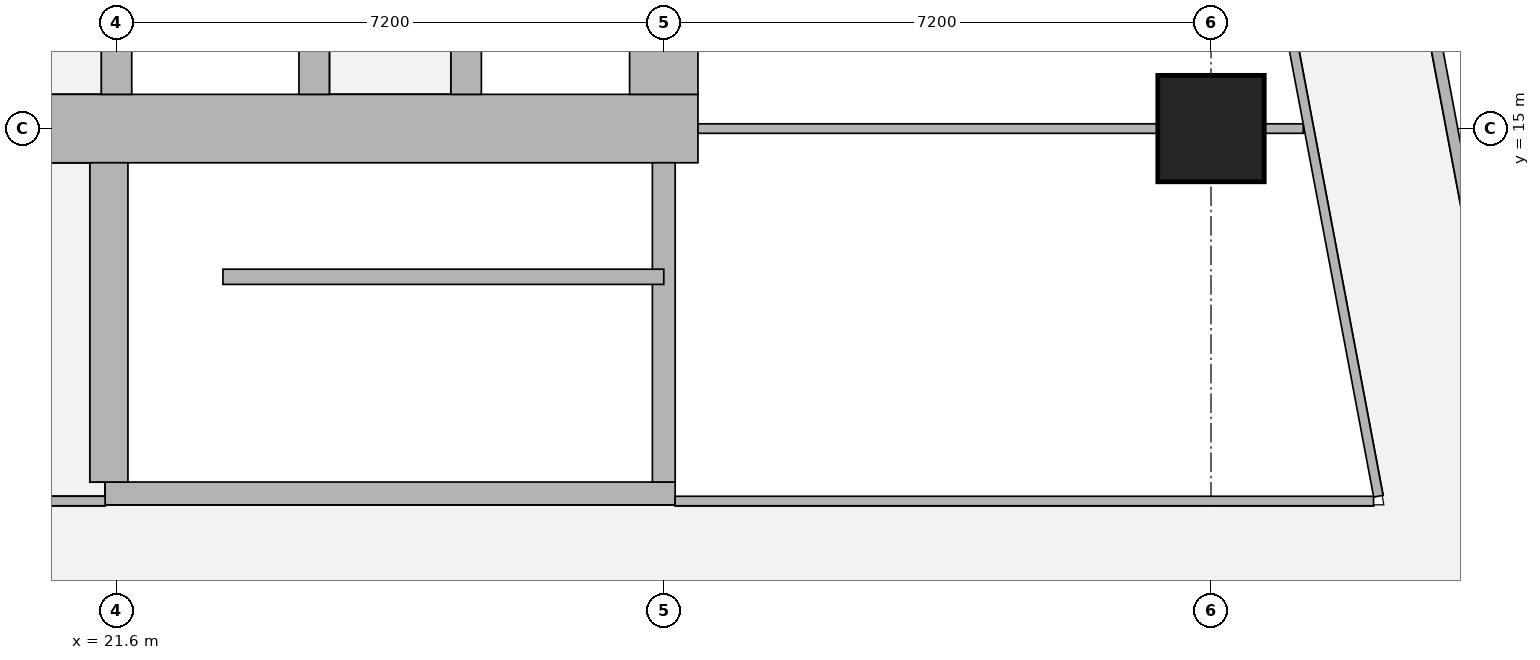
"""IFC4 building model, lengths in metres.
Left out: names, types, materials, properties, quantities, classifications, styles, units other than length and angle.
Written with IfcOpenShell. Run it as: python <this file> out.ifc"""

import sys

from ifc_helpers import new_model, si_unit, direction, frame, frame_2d, origin, origin_2d, place, context, subcontext, project, spatial, rectangle, extrude, element, fill, save


model = new_model("IFC4")
c1 = context("Model", 3, precision=1e-05, world=origin(), true_north=direction((0.0, 1.0)))
c2 = subcontext(c1, "Body", "Model", "MODEL_VIEW")
j1 = project(units=[si_unit("LENGTHUNIT", "METRE"), si_unit("PLANEANGLEUNIT", "RADIAN")], contexts=[c1])
p1 = place(None, origin())
s1 = spatial("IfcSite", under=j1, at=p1, CompositionType="ELEMENT")
p2 = place(p1, origin())
s2 = spatial("IfcBuilding", under=s1, at=p2, CompositionType="ELEMENT")
p3 = place(p2, frame((0.0, 0.0, 216.2)))
s3 = spatial("IfcBuildingStorey", under=s2, at=p3, CompositionType="ELEMENT", Elevation=216.2)
p4 = place(p3, frame((36.0, 15.0, 0.0), z_axis=(0.0, 0.0, 1.0), x_axis=(1.0, 0.0, 0.0)))
e1 = element("IfcColumn", 1, at=p4, inside=s3, PredefinedType="COLUMN", context=c2, shape_type="SweptSolid", body=[
    extrude(rectangle(XDim=1.4, YDim=1.4, at=origin_2d()), origin(), (0.0, 0.0, 1.0), 3.75),
])
p5 = place(p3, frame((13.95, 15.0, 0.0), z_axis=(0.0, 0.0, 1.0), x_axis=(1.0, 0.0, 0.0)))
e2 = element("IfcWall", 2, at=p5, inside=s3, PredefinedType="SHEAR", context=c2, shape_type="SweptSolid", body=[
    extrude(rectangle(XDim=15.3, YDim=0.9, at=frame_2d((7.65, 0.0))), origin(), (0.0, 0.0, 1.0), 3.75),
])
p6 = place(p5, frame((4.45, 0.0, 0.0)))
e3 = element("IfcOpeningElement", 3, at=p6, cuts=e2, PredefinedType="OPENING", context=c2, shape_type="SweptSolid", body=[
    extrude(rectangle(XDim=1.8, YDim=2.1, at=frame_2d((0.9, 1.05))), frame((0.0, 0.46, 0.0), z_axis=(0.0, -1.0, 0.0), x_axis=(1.0, 0.0, 0.0)), (0.0, 0.0, 1.0), 0.92),
])
p7 = place(p5, frame((10.7, 0.0, 0.0)))
e4 = element("IfcOpeningElement", 4, at=p7, cuts=e2, PredefinedType="OPENING", context=c2, shape_type="SweptSolid", body=[
    extrude(rectangle(XDim=1.1, YDim=2.1, at=frame_2d((0.55, 1.05))), frame((0.0, 0.46, 0.0), z_axis=(0.0, -1.0, 0.0), x_axis=(1.0, 0.0, 0.0)), (0.0, 0.0, 1.0), 0.92),
])
p8 = place(p3, frame((28.8, 15.45, 0.0), z_axis=(0.0, 0.0, 1.0), x_axis=(0.0, 1.0, 0.0)))
e5 = element("IfcWall", 5, at=p8, inside=s3, PredefinedType="SHEAR", context=c2, shape_type="SweptSolid", body=[
    extrude(rectangle(XDim=14.1, YDim=0.9, at=frame_2d((7.05, 0.0))), origin(), (0.0, 0.0, 1.0), 3.75),
])
p9 = place(p3, frame((21.6, 15.45, 0.0), z_axis=(0.0, 0.0, 1.0), x_axis=(0.0, 1.0, 0.0)))
e6 = element("IfcWall", 6, at=p9, inside=s3, PredefinedType="SHEAR", context=c2, shape_type="SweptSolid", body=[
    extrude(rectangle(XDim=14.1, YDim=0.4, at=frame_2d((7.05, 0.0))), origin(), (0.0, 0.0, 1.0), 3.75),
])
p10 = place(p9, frame((0.875, 0.0, 0.0)))
e7 = element("IfcOpeningElement", 7, at=p10, cuts=e6, PredefinedType="OPENING", context=c2, shape_type="SweptSolid", body=[
    extrude(rectangle(XDim=1.1, YDim=2.1, at=frame_2d((0.55, 1.05))), frame((0.0, 0.21, 0.0), z_axis=(0.0, -1.0, 0.0), x_axis=(1.0, 0.0, 0.0)), (0.0, 0.0, 1.0), 0.42),
])
p11 = place(p9, frame((4.625, 0.0, 0.0)))
e8 = element("IfcOpeningElement", 8, at=p11, cuts=e6, PredefinedType="OPENING", context=c2, shape_type="SweptSolid", body=[
    extrude(rectangle(XDim=1.1, YDim=2.1, at=frame_2d((0.55, 1.05))), frame((0.0, 0.21, 0.0), z_axis=(0.0, -1.0, 0.0), x_axis=(1.0, 0.0, 0.0)), (0.0, 0.0, 1.0), 0.42),
])
p12 = place(p9, frame((8.375, 0.0, 0.0)))
e9 = element("IfcOpeningElement", 9, at=p12, cuts=e6, PredefinedType="OPENING", context=c2, shape_type="SweptSolid", body=[
    extrude(rectangle(XDim=1.1, YDim=2.1, at=frame_2d((0.55, 1.05))), frame((0.0, 0.21, 0.0), z_axis=(0.0, -1.0, 0.0), x_axis=(1.0, 0.0, 0.0)), (0.0, 0.0, 1.0), 0.42),
])
p13 = place(p9, frame((12.125, 0.0, 0.0)))
e10 = element("IfcOpeningElement", 10, at=p13, cuts=e6, PredefinedType="OPENING", context=c2, shape_type="SweptSolid", body=[
    extrude(rectangle(XDim=1.1, YDim=2.1, at=frame_2d((0.55, 1.05))), frame((0.0, 0.21, 0.0), z_axis=(0.0, -1.0, 0.0), x_axis=(1.0, 0.0, 0.0)), (0.0, 0.0, 1.0), 0.42),
])
p14 = place(p3, frame((24.2, 15.45, 0.0), z_axis=(0.0, 0.0, 1.0), x_axis=(0.0, 1.0, 0.0)))
e11 = element("IfcWall", 11, at=p14, inside=s3, PredefinedType="SHEAR", context=c2, shape_type="SweptSolid", body=[
    extrude(rectangle(XDim=14.1, YDim=0.4, at=frame_2d((7.05, 0.0))), origin(), (0.0, 0.0, 1.0), 3.75),
])
p15 = place(p3, frame((26.2, 15.45, 0.0), z_axis=(0.0, 0.0, 1.0), x_axis=(0.0, 1.0, 0.0)))
e12 = element("IfcWall", 12, at=p15, inside=s3, PredefinedType="SHEAR", context=c2, shape_type="SweptSolid", body=[
    extrude(rectangle(XDim=3.1, YDim=0.4, at=frame_2d((1.55, 0.0))), origin(), (0.0, 0.0, 1.0), 3.75),
])
p16 = place(p15, frame((0.825, 0.0, 0.0)))
e13 = element("IfcOpeningElement", 13, at=p16, cuts=e12, PredefinedType="OPENING", context=c2, shape_type="SweptSolid", body=[
    extrude(rectangle(XDim=1.2, YDim=2.1, at=frame_2d((0.6, 1.05))), frame((0.0, 0.21, 0.0), z_axis=(0.0, -1.0, 0.0), x_axis=(1.0, 0.0, 0.0)), (0.0, 0.0, 1.0), 0.42),
])
p17 = place(p3, frame((21.45, 10.2, 0.0), z_axis=(0.0, 0.0, 1.0), x_axis=(1.0, 0.0, 0.0)))
e14 = element("IfcWall", 14, at=p17, inside=s3, PredefinedType="SHEAR", context=c2, shape_type="SweptSolid", body=[
    extrude(rectangle(XDim=7.5, YDim=0.3, at=frame_2d((3.75, 0.0))), origin(), (0.0, 0.0, 1.0), 3.75),
])
p18 = place(p17, frame((0.5, 0.0, 0.0)))
e15 = element("IfcOpeningElement", 15, at=p18, cuts=e14, PredefinedType="OPENING", context=c2, shape_type="SweptSolid", body=[
    extrude(rectangle(XDim=1.1, YDim=2.1, at=frame_2d((0.55, 1.05))), frame((0.0, 0.16, 0.0), z_axis=(0.0, -1.0, 0.0), x_axis=(1.0, 0.0, 0.0)), (0.0, 0.0, 1.0), 0.32),
])
p19 = place(p3, frame((21.5, 10.35, 0.0), z_axis=(0.0, 0.0, 1.0), x_axis=(0.0, 1.0, 0.0)))
e16 = element("IfcWall", 16, at=p19, inside=s3, PredefinedType="SHEAR", context=c2, shape_type="SweptSolid", body=[
    extrude(rectangle(XDim=4.2, YDim=0.5, at=frame_2d((2.1, 0.0))), origin(), (0.0, 0.0, 1.0), 3.75),
])
p20 = place(p3, frame((28.8, 10.35, 0.0), z_axis=(0.0, 0.0, 1.0), x_axis=(0.0, 1.0, 0.0)))
e17 = element("IfcWall", 17, at=p20, inside=s3, PredefinedType="SHEAR", context=c2, shape_type="SweptSolid", body=[
    extrude(rectangle(XDim=4.2, YDim=0.3, at=frame_2d((2.1, 0.0))), origin(), (0.0, 0.0, 1.0), 3.75),
])
p21 = place(p3, frame((33.933, 42.73, 0.0), z_axis=(0.0, 0.0, 1.0), x_axis=(0.185595417643, -0.982626246825, 0.0)))
e18 = element("IfcWall", 18, at=p21, inside=s3, PredefinedType="SOLIDWALL", context=c2, shape_type="SweptSolid", body=[
    extrude(rectangle(XDim=41.051, YDim=0.15, at=frame_2d((20.525, 0.0))), origin(), (0.0, 0.0, 1.0), 2.5),
])
p22 = place(p21, frame((12.266, 0.0, 0.0)))
e19 = element("IfcOpeningElement", 19, at=p22, cuts=e18, PredefinedType="OPENING", context=c2, shape_type="SweptSolid", body=[
    extrude(rectangle(XDim=1.0, YDim=2.1, at=frame_2d((0.5, 1.05))), frame((0.0, 0.085, 0.0), z_axis=(0.0, -1.0, 0.0), x_axis=(1.0, 0.0, 0.0)), (0.0, 0.0, 1.0), 0.17),
])
p23 = place(p21, frame((16.082, 0.0, 0.0)))
e20 = element("IfcOpeningElement", 20, at=p23, cuts=e18, PredefinedType="OPENING", context=c2, shape_type="SweptSolid", body=[
    extrude(rectangle(XDim=1.0, YDim=2.1, at=frame_2d((0.5, 1.05))), frame((0.0, 0.085, 0.0), z_axis=(0.0, -1.0, 0.0), x_axis=(1.0, 0.0, 0.0)), (0.0, 0.0, 1.0), 0.17),
])
p24 = place(p21, frame((24.369, 0.0, 0.0)))
e21 = element("IfcOpeningElement", 21, at=p24, cuts=e18, PredefinedType="OPENING", context=c2, shape_type="SweptSolid", body=[
    extrude(rectangle(XDim=1.0, YDim=2.1, at=frame_2d((0.5, 1.05))), frame((0.0, 0.085, 0.0), z_axis=(0.0, -1.0, 0.0), x_axis=(1.0, 0.0, 0.0)), (0.0, 0.0, 1.0), 0.17),
])
p25 = place(p21, frame((30.862, 0.0, 0.0)))
e22 = element("IfcOpeningElement", 22, at=p25, cuts=e18, PredefinedType="OPENING", context=c2, shape_type="SweptSolid", body=[
    extrude(rectangle(XDim=1.0, YDim=2.1, at=frame_2d((0.5, 1.05))), frame((0.0, 0.085, 0.0), z_axis=(0.0, -1.0, 0.0), x_axis=(1.0, 0.0, 0.0)), (0.0, 0.0, 1.0), 0.17),
])
p26 = place(p3, frame((10.713, 10.1, 0.0), z_axis=(0.0, 0.0, 1.0), x_axis=(1.0, 0.0, 0.0)))
e23 = element("IfcWall", 23, at=p26, inside=s3, PredefinedType="PARTITIONING", context=c2, shape_type="SweptSolid", body=[
    extrude(rectangle(XDim=10.737, YDim=0.125, at=frame_2d((5.369, 0.0))), origin(), (0.0, 0.0, 1.0), 3.5),
])
p27 = place(p26, frame((7.282, 0.0, 0.0)))
e24 = element("IfcOpeningElement", 24, at=p27, cuts=e23, PredefinedType="OPENING", context=c2, shape_type="SweptSolid", body=[
    extrude(rectangle(XDim=1.8, YDim=2.1, at=frame_2d((0.9, 1.05))), frame((0.0, 0.073, 0.0), z_axis=(0.0, -1.0, 0.0), x_axis=(1.0, 0.0, 0.0)), (0.0, 0.0, 1.0), 0.145),
])
p28 = place(p3, frame((28.95, 10.1, 0.0), z_axis=(0.0, 0.0, 1.0), x_axis=(1.0, 0.0, 0.0)))
e25 = element("IfcWall", 25, at=p28, inside=s3, PredefinedType="PARTITIONING", context=c2, shape_type="SweptSolid", body=[
    extrude(rectangle(XDim=9.188, YDim=0.125, at=frame_2d((4.594, 0.0))), origin(), (0.0, 0.0, 1.0), 3.5),
])
p29 = place(p3, frame((38.202, 10.163, 0.0), z_axis=(0.0, 0.0, 1.0), x_axis=(-0.185610321132, 0.982623431783, 0.0)))
e26 = element("IfcWall", 26, at=p29, inside=s3, PredefinedType="PARTITIONING", context=c2, shape_type="SweptSolid", body=[
    extrude(rectangle(XDim=25.111, YDim=0.125, at=frame_2d((12.556, 0.0))), origin(), (0.0, 0.0, 1.0), 2.5),
])
p30 = place(p29, frame((0.708, 0.0, 0.0)))
e27 = element("IfcOpeningElement", 27, at=p30, cuts=e26, PredefinedType="OPENING", context=c2, shape_type="SweptSolid", body=[
    extrude(rectangle(XDim=1.0, YDim=2.1, at=frame_2d((0.5, 1.05))), frame((0.0, 0.073, 0.0), z_axis=(0.0, -1.0, 0.0), x_axis=(1.0, 0.0, 0.0)), (0.0, 0.0, 1.0), 0.145),
])
p31 = place(p29, frame((5.9, 0.0, 0.0)))
e28 = element("IfcOpeningElement", 28, at=p31, cuts=e26, PredefinedType="OPENING", context=c2, shape_type="SweptSolid", body=[
    extrude(rectangle(XDim=1.0, YDim=2.1, at=frame_2d((0.5, 1.05))), frame((0.0, 0.073, 0.0), z_axis=(0.0, -1.0, 0.0), x_axis=(1.0, 0.0, 0.0)), (0.0, 0.0, 1.0), 0.145),
])
p32 = place(p29, frame((13.378, 0.0, 0.0)))
e29 = element("IfcOpeningElement", 29, at=p32, cuts=e26, PredefinedType="OPENING", context=c2, shape_type="SweptSolid", body=[
    extrude(rectangle(XDim=1.0, YDim=2.1, at=frame_2d((0.5, 1.05))), frame((0.0, 0.073, 0.0), z_axis=(0.0, -1.0, 0.0), x_axis=(1.0, 0.0, 0.0)), (0.0, 0.0, 1.0), 0.145),
])
p33 = place(p29, frame((21.15, 0.0, 0.0)))
e30 = element("IfcOpeningElement", 30, at=p33, cuts=e26, PredefinedType="OPENING", context=c2, shape_type="SweptSolid", body=[
    extrude(rectangle(XDim=1.0, YDim=2.1, at=frame_2d((0.5, 1.05))), frame((0.0, 0.073, 0.0), z_axis=(0.0, -1.0, 0.0), x_axis=(1.0, 0.0, 0.0)), (0.0, 0.0, 1.0), 0.145),
])
p34 = place(p3, frame((29.25, 15.0, 0.0), z_axis=(0.0, 0.0, 1.0), x_axis=(1.0, 0.0, 0.0)))
e31 = element("IfcWall", 31, at=p34, inside=s3, PredefinedType="PARTITIONING", context=c2, shape_type="SweptSolid", body=[
    extrude(rectangle(XDim=6.049, YDim=0.125, at=frame_2d((3.024, 0.0))), origin(), (0.0, 0.0, 1.0), 3.5),
])
p35 = place(p3, frame((36.701, 15.0, 0.0), z_axis=(0.0, 0.0, 1.0), x_axis=(1.0, 0.0, 0.0)))
e32 = element("IfcWall", 32, at=p35, inside=s3, PredefinedType="PARTITIONING", context=c2, shape_type="SweptSolid", body=[
    extrude(rectangle(XDim=0.512, YDim=0.125, at=frame_2d((0.256, 0.0))), origin(), (0.0, 0.0, 1.0), 3.5),
])
p36 = place(p3, frame((23.0, 13.05, 0.0), z_axis=(0.0, 0.0, 1.0), x_axis=(1.0, 0.0, 0.0)))
e33 = element("IfcWall", 33, at=p36, inside=s3, PredefinedType="SHEAR", context=c2, shape_type="SweptSolid", body=[
    extrude(rectangle(XDim=5.8, YDim=0.2, at=frame_2d((2.9, 0.0))), origin(), (0.0, 0.0, 1.0), 3.75),
])
p37 = place(p30, origin())
e34 = element("IfcDoor", 34, at=p37, inside=s3, OperationType="SINGLE_SWING_LEFT", PredefinedType="DOOR", context=c2, shape_type="SweptSolid", body=[
    extrude(rectangle(XDim=1.0, YDim=2.1, at=frame_2d((0.5, 1.05))), frame((0.0, 0.025, 0.0), z_axis=(0.0, -1.0, 0.0), x_axis=(1.0, 0.0, 0.0)), (0.0, 0.0, 1.0), 0.05),
])
fill(e27, e34)
p38 = place(p31, origin())
e35 = element("IfcDoor", 35, at=p38, inside=s3, OperationType="SINGLE_SWING_LEFT", PredefinedType="DOOR", context=c2, shape_type="SweptSolid", body=[
    extrude(rectangle(XDim=1.0, YDim=2.1, at=frame_2d((0.5, 1.05))), frame((0.0, 0.025, 0.0), z_axis=(0.0, -1.0, 0.0), x_axis=(1.0, 0.0, 0.0)), (0.0, 0.0, 1.0), 0.05),
])
fill(e28, e35)
p39 = place(p7, origin())
e36 = element("IfcDoor", 36, at=p39, inside=s3, OperationType="SINGLE_SWING_LEFT", PredefinedType="DOOR", context=c2, shape_type="SweptSolid", body=[
    extrude(rectangle(XDim=1.1, YDim=2.1, at=frame_2d((0.55, 1.05))), frame((0.0, 0.025, 0.0), z_axis=(0.0, -1.0, 0.0), x_axis=(1.0, 0.0, 0.0)), (0.0, 0.0, 1.0), 0.05),
])
fill(e4, e36)
p40 = place(p18, origin())
e37 = element("IfcDoor", 37, at=p40, inside=s3, OperationType="SINGLE_SWING_LEFT", PredefinedType="DOOR", context=c2, shape_type="SweptSolid", body=[
    extrude(rectangle(XDim=1.1, YDim=2.1, at=frame_2d((0.55, 1.05))), frame((0.0, 0.025, 0.0), z_axis=(0.0, -1.0, 0.0), x_axis=(1.0, 0.0, 0.0)), (0.0, 0.0, 1.0), 0.05),
])
fill(e15, e37)
save(model, sys.argv[1])
